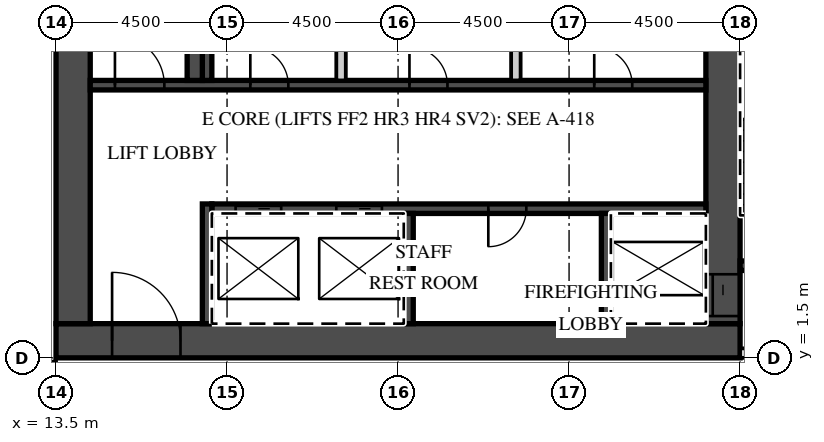
"""IFC4 building model, lengths in metres.
Left out: names, types, materials, properties, quantities, classifications, styles, units other than length and angle.
Written with IfcOpenShell. Run it as: python <this file> out.ifc"""

import sys

from ifc_helpers import new_model, si_unit, direction, frame, frame_2d, origin, place, context, subcontext, project, spatial, rectangle, extrude, element, fill, save


model = new_model("IFC4")
c1 = context("Model", 3, precision=1e-05, world=origin(), true_north=direction((0.0, 1.0)))
c2 = subcontext(c1, "Body", "Model", "MODEL_VIEW")
j1 = project(units=[si_unit("LENGTHUNIT", "METRE"), si_unit("PLANEANGLEUNIT", "RADIAN")], contexts=[c1])
p1 = place(None, origin())
s1 = spatial("IfcSite", under=j1, at=p1, CompositionType="ELEMENT")
p2 = place(p1, origin())
s2 = spatial("IfcBuilding", under=s1, at=p2, CompositionType="ELEMENT")
p3 = place(p2, frame((0.0, 0.0, 268.5)))
s3 = spatial("IfcBuildingStorey", under=s2, at=p3, CompositionType="ELEMENT", Elevation=268.5)
p4 = place(p3, frame((-39.909, 1.3, 0.0), z_axis=(0.0, 0.0, 1.0), x_axis=(1.0, 0.0, 0.0)))
e1 = element("IfcWall", 1, at=p4, inside=s3, PredefinedType="PARTITIONING", context=c2, shape_type="SweptSolid", body=[
    extrude(rectangle(XDim=53.409, YDim=0.2, at=frame_2d((26.705, 0.0))), origin(), (0.0, 0.0, 1.0), 3.02),
])
p5 = place(p4, frame((0.15, 0.0, 0.0)))
e2 = element("IfcOpeningElement", 2, at=p5, cuts=e1, PredefinedType="OPENING", context=c2, shape_type="SweptSolid", body=[
    extrude(rectangle(XDim=0.9, YDim=2.1, at=frame_2d((0.45, 1.05))), frame((0.0, 0.11, 0.0), z_axis=(0.0, -1.0, 0.0), x_axis=(1.0, 0.0, 0.0)), (0.0, 0.0, 1.0), 0.22),
])
p6 = place(p4, frame((9.271, 0.0, 0.0)))
e3 = element("IfcOpeningElement", 3, at=p6, cuts=e1, PredefinedType="OPENING", context=c2, shape_type="SweptSolid", body=[
    extrude(rectangle(XDim=1.2, YDim=2.1, at=frame_2d((0.6, 1.05))), frame((0.0, 0.11, 0.0), z_axis=(0.0, -1.0, 0.0), x_axis=(1.0, 0.0, 0.0)), (0.0, 0.0, 1.0), 0.22),
])
p7 = place(p4, frame((18.271, 0.0, 0.0)))
e4 = element("IfcOpeningElement", 4, at=p7, cuts=e1, PredefinedType="OPENING", context=c2, shape_type="SweptSolid", body=[
    extrude(rectangle(XDim=1.2, YDim=2.1, at=frame_2d((0.6, 1.05))), frame((0.0, 0.11, 0.0), z_axis=(0.0, -1.0, 0.0), x_axis=(1.0, 0.0, 0.0)), (0.0, 0.0, 1.0), 0.22),
])
p8 = place(p4, frame((27.271, 0.0, 0.0)))
e5 = element("IfcOpeningElement", 5, at=p8, cuts=e1, PredefinedType="OPENING", context=c2, shape_type="SweptSolid", body=[
    extrude(rectangle(XDim=1.2, YDim=2.1, at=frame_2d((0.6, 1.05))), frame((0.0, 0.11, 0.0), z_axis=(0.0, -1.0, 0.0), x_axis=(1.0, 0.0, 0.0)), (0.0, 0.0, 1.0), 0.22),
])
p9 = place(p4, frame((36.271, 0.0, 0.0)))
e6 = element("IfcOpeningElement", 6, at=p9, cuts=e1, PredefinedType="OPENING", context=c2, shape_type="SweptSolid", body=[
    extrude(rectangle(XDim=1.2, YDim=2.1, at=frame_2d((0.6, 1.05))), frame((0.0, 0.11, 0.0), z_axis=(0.0, -1.0, 0.0), x_axis=(1.0, 0.0, 0.0)), (0.0, 0.0, 1.0), 0.22),
])
p10 = place(p4, frame((42.346, 0.0, 0.0)))
e7 = element("IfcOpeningElement", 7, at=p10, cuts=e1, PredefinedType="OPENING", context=c2, shape_type="SweptSolid", body=[
    extrude(rectangle(XDim=1.2, YDim=2.1, at=frame_2d((0.6, 1.05))), frame((0.0, 0.11, 0.0), z_axis=(0.0, -1.0, 0.0), x_axis=(1.0, 0.0, 0.0)), (0.0, 0.0, 1.0), 0.22),
])
p11 = place(p4, frame((51.834, 0.0, 0.0)))
e8 = element("IfcOpeningElement", 8, at=p11, cuts=e1, PredefinedType="OPENING", context=c2, shape_type="SweptSolid", body=[
    extrude(rectangle(XDim=1.0, YDim=2.1, at=frame_2d((0.5, 1.05))), frame((0.0, 0.11, 0.0), z_axis=(0.0, -1.0, 0.0), x_axis=(1.0, 0.0, 0.0)), (0.0, 0.0, 1.0), 0.22),
])
p12 = place(p3, frame((13.5, 1.95, 0.0), z_axis=(0.0, 0.0, 1.0), x_axis=(1.0, 0.0, 0.0)))
e9 = element("IfcWall", 9, at=p12, inside=s3, PredefinedType="SHEAR", context=c2, shape_type="SweptSolid", body=[
    extrude(rectangle(XDim=18.0, YDim=0.9, at=frame_2d((9.0, 0.0))), origin(), (0.0, 0.0, 1.0), 3.02),
])
p13 = place(p12, frame((1.475, 0.0, 0.0)))
e10 = element("IfcOpeningElement", 10, at=p13, cuts=e9, PredefinedType="OPENING", context=c2, shape_type="SweptSolid", body=[
    extrude(rectangle(XDim=1.8, YDim=2.1, at=frame_2d((0.9, 1.05))), frame((0.0, 0.46, 0.0), z_axis=(0.0, -1.0, 0.0), x_axis=(1.0, 0.0, 0.0)), (0.0, 0.0, 1.0), 0.92),
])
p14 = place(p3, frame((31.05, 2.4, 0.0), z_axis=(0.0, 0.0, 1.0), x_axis=(0.0, 1.0, 0.0)))
e11 = element("IfcWall", 11, at=p14, inside=s3, PredefinedType="SHEAR", context=c2, shape_type="SweptSolid", body=[
    extrude(rectangle(XDim=12.8, YDim=0.9, at=frame_2d((6.4, 0.0))), origin(), (0.0, 0.0, 1.0), 3.02),
])
p15 = place(p14, frame((0.2, 0.0, 0.0)))
e12 = element("IfcOpeningElement", 12, at=p15, cuts=e11, PredefinedType="OPENING", context=c2, shape_type="SweptSolid", body=[
    extrude(rectangle(XDim=1.1, YDim=2.1, at=frame_2d((0.55, 1.05))), frame((0.0, 0.46, 0.0), z_axis=(0.0, -1.0, 0.0), x_axis=(1.0, 0.0, 0.0)), (0.0, 0.0, 1.0), 0.92),
])
p16 = place(p3, frame((13.95, 2.4, 0.0), z_axis=(0.0, 0.0, 1.0), x_axis=(0.0, 1.0, 0.0)))
e13 = element("IfcWall", 13, at=p16, inside=s3, PredefinedType="SHEAR", context=c2, shape_type="SweptSolid", body=[
    extrude(rectangle(XDim=12.2, YDim=0.9, at=frame_2d((6.1, 0.0))), origin(), (0.0, 0.0, 1.0), 3.02),
])
p17 = place(p3, frame((17.6, 5.425, 0.0), z_axis=(0.0, 0.0, 1.0), x_axis=(1.0, 0.0, 0.0)))
e14 = element("IfcWall", 14, at=p17, inside=s3, PredefinedType="SHEAR", context=c2, shape_type="SweptSolid", body=[
    extrude(rectangle(XDim=13.0, YDim=0.25, at=frame_2d((6.5, 0.0))), origin(), (0.0, 0.0, 1.0), 3.02),
])
p18 = place(p17, frame((3.275, 0.0, 0.0)))
e15 = element("IfcOpeningElement", 15, at=p18, cuts=e14, PredefinedType="OPENING", context=c2, shape_type="SweptSolid", body=[
    extrude(rectangle(XDim=1.2, YDim=2.1, at=frame_2d((0.6, 1.05))), frame((0.0, 0.135, 0.0), z_axis=(0.0, -1.0, 0.0), x_axis=(1.0, 0.0, 0.0)), (0.0, 0.0, 1.0), 0.27),
])
p19 = place(p17, frame((0.625, 0.0, 0.0)))
e16 = element("IfcOpeningElement", 16, at=p19, cuts=e14, PredefinedType="OPENING", context=c2, shape_type="SweptSolid", body=[
    extrude(rectangle(XDim=1.2, YDim=2.1, at=frame_2d((0.6, 1.05))), frame((0.0, 0.135, 0.0), z_axis=(0.0, -1.0, 0.0), x_axis=(1.0, 0.0, 0.0)), (0.0, 0.0, 1.0), 0.27),
])
p20 = place(p17, frame((7.275, 0.0, 0.0)))
e17 = element("IfcOpeningElement", 17, at=p20, cuts=e14, PredefinedType="OPENING", context=c2, shape_type="SweptSolid", body=[
    extrude(rectangle(XDim=1.0, YDim=2.1, at=frame_2d((0.5, 1.05))), frame((0.0, 0.135, 0.0), z_axis=(0.0, -1.0, 0.0), x_axis=(1.0, 0.0, 0.0)), (0.0, 0.0, 1.0), 0.27),
])
p21 = place(p3, frame((17.475, 2.4, 0.0), z_axis=(0.0, 0.0, 1.0), x_axis=(0.0, 1.0, 0.0)))
e18 = element("IfcWall", 18, at=p21, inside=s3, PredefinedType="SHEAR", context=c2, shape_type="SweptSolid", body=[
    extrude(rectangle(XDim=3.15, YDim=0.25, at=frame_2d((1.575, 0.0))), origin(), (0.0, 0.0, 1.0), 3.02),
])
for number, where, z_axis, x_axis in (
    (19, (27.975, 2.4, 0.0), (0.0, 0.0, 1.0), (0.0, 1.0, 0.0)),
    (20, (22.775, 2.4, 0.0), (0.0, 0.0, 1.0), (0.0, 1.0, 0.0)),
):
    element("IfcWall", number, at=place(p3, frame(where, z_axis=z_axis, x_axis=x_axis)), inside=s3, PredefinedType="SHEAR", context=c2, shape_type="SweptSolid", body=[
        extrude(rectangle(XDim=2.9, YDim=0.25, at=frame_2d((1.45, 0.0))), origin(), (0.0, 0.0, 1.0), 3.02),
    ])
p22 = place(p3, frame((14.4, 8.675, 0.0), z_axis=(0.0, 0.0, 1.0), x_axis=(1.0, 0.0, 0.0)))
e21 = element("IfcWall", 21, at=p22, inside=s3, PredefinedType="SHEAR", context=c2, shape_type="SweptSolid", body=[
    extrude(rectangle(XDim=16.2, YDim=0.25, at=frame_2d((8.1, 0.0))), origin(), (0.0, 0.0, 1.0), 3.02),
])
p23 = place(p22, frame((0.65, 0.0, 0.0)))
e22 = element("IfcOpeningElement", 22, at=p23, cuts=e21, PredefinedType="OPENING", context=c2, shape_type="SweptSolid", body=[
    extrude(rectangle(XDim=1.3, YDim=2.1, at=frame_2d((0.65, 1.05))), frame((0.0, 0.135, 0.0), z_axis=(0.0, -1.0, 0.0), x_axis=(1.0, 0.0, 0.0)), (0.0, 0.0, 1.0), 0.27),
])
p24 = place(p22, frame((13.262, 0.0, 0.0)))
e23 = element("IfcOpeningElement", 23, at=p24, cuts=e21, PredefinedType="OPENING", context=c2, shape_type="SweptSolid", body=[
    extrude(rectangle(XDim=1.0, YDim=2.1, at=frame_2d((0.5, 1.05))), frame((0.0, 0.135, 0.0), z_axis=(0.0, -1.0, 0.0), x_axis=(1.0, 0.0, 0.0)), (0.0, 0.0, 1.0), 0.27),
])
p25 = place(p22, frame((8.4, 0.0, 0.0)))
e24 = element("IfcOpeningElement", 24, at=p25, cuts=e21, PredefinedType="OPENING", context=c2, shape_type="SweptSolid", body=[
    extrude(rectangle(XDim=1.0, YDim=2.1, at=frame_2d((0.5, 1.05))), frame((0.0, 0.135, 0.0), z_axis=(0.0, -1.0, 0.0), x_axis=(1.0, 0.0, 0.0)), (0.0, 0.0, 1.0), 0.27),
])
p26 = place(p22, frame((4.212, 0.0, 0.0)))
e25 = element("IfcOpeningElement", 25, at=p26, cuts=e21, PredefinedType="OPENING", context=c2, shape_type="SweptSolid", body=[
    extrude(rectangle(XDim=1.0, YDim=2.1, at=frame_2d((0.5, 1.05))), frame((0.0, 0.135, 0.0), z_axis=(0.0, -1.0, 0.0), x_axis=(1.0, 0.0, 0.0)), (0.0, 0.0, 1.0), 0.27),
])
p27 = place(p3, frame((17.475, 8.8, 0.0), z_axis=(0.0, 0.0, 1.0), x_axis=(0.0, 1.0, 0.0)))
e26 = element("IfcWall", 26, at=p27, inside=s3, PredefinedType="SHEAR", context=c2, shape_type="SweptSolid", body=[
    extrude(rectangle(XDim=2.9, YDim=0.25, at=frame_2d((1.45, 0.0))), origin(), (0.0, 0.0, 1.0), 3.02),
])
for number, where, z_axis, x_axis in (
    (27, (25.6, 8.8, 0.0), (0.0, 0.0, 1.0), (0.0, 1.0, 0.0)),
    (28, (21.0, 8.8, 0.0), (0.0, 0.0, 1.0), (0.0, 1.0, 0.0)),
):
    element("IfcWall", number, at=place(p3, frame(where, z_axis=z_axis, x_axis=x_axis)), inside=s3, PredefinedType="PARTITIONING", context=c2, shape_type="SweptSolid", body=[
        extrude(rectangle(XDim=2.9, YDim=0.25, at=frame_2d((1.45, 0.0))), origin(), (0.0, 0.0, 1.0), 3.02),
    ])
p28 = place(p3, frame((17.15, 8.8, 0.0), z_axis=(0.0, 0.0, 1.0), x_axis=(0.0, 1.0, 0.0)))
e29 = element("IfcWall", 29, at=p28, inside=s3, PredefinedType="SHEAR", context=c2, shape_type="SweptSolid", body=[
    extrude(rectangle(XDim=5.8, YDim=0.4, at=frame_2d((2.9, 0.0))), origin(), (0.0, 0.0, 1.0), 3.02),
])
p29 = place(p3, frame((31.5, 1.625, 0.0), z_axis=(0.0, 0.0, 1.0), x_axis=(1.0, 0.0, 0.0)))
e30 = element("IfcWall", 30, at=p29, inside=s3, PredefinedType="PARTITIONING", context=c2, shape_type="SweptSolid", body=[
    extrude(rectangle(XDim=5.012, YDim=0.25, at=frame_2d((2.506, 0.0))), origin(), (0.0, 0.0, 1.0), 3.02),
])
p30 = place(p29, frame((0.625, 0.0, 0.0)))
e31 = element("IfcOpeningElement", 31, at=p30, cuts=e30, PredefinedType="OPENING", context=c2, shape_type="SweptSolid", body=[
    extrude(rectangle(XDim=1.3, YDim=2.1, at=frame_2d((0.65, 1.05))), frame((0.0, 0.135, 0.0), z_axis=(0.0, -1.0, 0.0), x_axis=(1.0, 0.0, 0.0)), (0.0, 0.0, 1.0), 0.27),
])
p31 = place(p29, frame((3.25, 0.0, 0.0)))
e32 = element("IfcOpeningElement", 32, at=p31, cuts=e30, PredefinedType="OPENING", context=c2, shape_type="SweptSolid", body=[
    extrude(rectangle(XDim=1.1, YDim=2.1, at=frame_2d((0.55, 1.05))), frame((0.0, 0.135, 0.0), z_axis=(0.0, -1.0, 0.0), x_axis=(1.0, 0.0, 0.0)), (0.0, 0.0, 1.0), 0.27),
])
p32 = place(p3, frame((31.5, 3.925, 0.0), z_axis=(0.0, 0.0, 1.0), x_axis=(1.0, 0.0, 0.0)))
e33 = element("IfcWall", 33, at=p32, inside=s3, PredefinedType="SHEAR", context=c2, shape_type="SweptSolid", body=[
    extrude(rectangle(XDim=2.55, YDim=0.25, at=frame_2d((1.275, 0.0))), origin(), (0.0, 0.0, 1.0), 3.02),
])
p33 = place(p32, frame((0.625, 0.0, 0.0)))
e34 = element("IfcOpeningElement", 34, at=p33, cuts=e33, PredefinedType="OPENING", context=c2, shape_type="SweptSolid", body=[
    extrude(rectangle(XDim=1.3, YDim=2.1, at=frame_2d((0.65, 1.05))), frame((0.0, 0.135, 0.0), z_axis=(0.0, -1.0, 0.0), x_axis=(1.0, 0.0, 0.0)), (0.0, 0.0, 1.0), 0.27),
])
p34 = place(p18, origin())
e35 = element("IfcDoor", 35, at=p34, inside=s3, OperationType="SLIDING_TO_RIGHT", PredefinedType="DOOR", context=c2, shape_type="SweptSolid", body=[
    extrude(rectangle(XDim=1.2, YDim=2.1, at=frame_2d((0.6, 1.05))), frame((0.0, 0.025, 0.0), z_axis=(0.0, -1.0, 0.0), x_axis=(1.0, 0.0, 0.0)), (0.0, 0.0, 1.0), 0.05),
])
fill(e15, e35)
p35 = place(p19, origin())
e36 = element("IfcDoor", 36, at=p35, inside=s3, OperationType="SLIDING_TO_LEFT", PredefinedType="DOOR", context=c2, shape_type="SweptSolid", body=[
    extrude(rectangle(XDim=1.2, YDim=2.1, at=frame_2d((0.6, 1.05))), frame((0.0, 0.025, 0.0), z_axis=(0.0, -1.0, 0.0), x_axis=(1.0, 0.0, 0.0)), (0.0, 0.0, 1.0), 0.05),
])
fill(e16, e36)
p36 = place(p15, origin())
e37 = element("IfcDoor", 37, at=p36, inside=s3, OperationType="SLIDING_TO_LEFT", PredefinedType="DOOR", context=c2, shape_type="SweptSolid", body=[
    extrude(rectangle(XDim=1.1, YDim=2.1, at=frame_2d((0.55, 1.05))), frame((0.0, 0.025, 0.0), z_axis=(0.0, -1.0, 0.0), x_axis=(1.0, 0.0, 0.0)), (0.0, 0.0, 1.0), 0.05),
])
fill(e12, e37)
p37 = place(p13, origin())
e38 = element("IfcDoor", 38, at=p37, inside=s3, OperationType="DOUBLE_DOOR_DOUBLE_SWING", PredefinedType="DOOR", context=c2, shape_type="SweptSolid", body=[
    extrude(rectangle(XDim=1.8, YDim=2.1, at=frame_2d((0.9, 1.05))), frame((0.0, 0.025, 0.0), z_axis=(0.0, -1.0, 0.0), x_axis=(1.0, 0.0, 0.0)), (0.0, 0.0, 1.0), 0.05),
])
fill(e10, e38)
p38 = place(p23, origin())
e39 = element("IfcDoor", 39, at=p38, inside=s3, OperationType="SINGLE_SWING_LEFT", PredefinedType="DOOR", context=c2, shape_type="SweptSolid", body=[
    extrude(rectangle(XDim=1.3, YDim=2.1, at=frame_2d((0.65, 1.05))), frame((0.0, 0.025, 0.0), z_axis=(0.0, -1.0, 0.0), x_axis=(1.0, 0.0, 0.0)), (0.0, 0.0, 1.0), 0.05),
])
fill(e22, e39)
p39 = place(p24, origin())
e40 = element("IfcDoor", 40, at=p39, inside=s3, OperationType="SINGLE_SWING_LEFT", PredefinedType="DOOR", context=c2, shape_type="SweptSolid", body=[
    extrude(rectangle(XDim=1.0, YDim=2.1, at=frame_2d((0.5, 1.05))), frame((0.0, 0.025, 0.0), z_axis=(0.0, -1.0, 0.0), x_axis=(1.0, 0.0, 0.0)), (0.0, 0.0, 1.0), 0.05),
])
fill(e23, e40)
p40 = place(p25, origin())
e41 = element("IfcDoor", 41, at=p40, inside=s3, OperationType="SINGLE_SWING_LEFT", PredefinedType="DOOR", context=c2, shape_type="SweptSolid", body=[
    extrude(rectangle(XDim=1.0, YDim=2.1, at=frame_2d((0.5, 1.05))), frame((0.0, 0.025, 0.0), z_axis=(0.0, -1.0, 0.0), x_axis=(1.0, 0.0, 0.0)), (0.0, 0.0, 1.0), 0.05),
])
fill(e24, e41)
p41 = place(p26, origin())
e42 = element("IfcDoor", 42, at=p41, inside=s3, OperationType="SINGLE_SWING_LEFT", PredefinedType="DOOR", context=c2, shape_type="SweptSolid", body=[
    extrude(rectangle(XDim=1.0, YDim=2.1, at=frame_2d((0.5, 1.05))), frame((0.0, 0.025, 0.0), z_axis=(0.0, -1.0, 0.0), x_axis=(1.0, 0.0, 0.0)), (0.0, 0.0, 1.0), 0.05),
])
fill(e25, e42)
p42 = place(p20, origin())
e43 = element("IfcDoor", 43, at=p42, inside=s3, OperationType="SINGLE_SWING_LEFT", PredefinedType="DOOR", context=c2, shape_type="SweptSolid", body=[
    extrude(rectangle(XDim=1.0, YDim=2.1, at=frame_2d((0.5, 1.05))), frame((0.0, 0.025, 0.0), z_axis=(0.0, -1.0, 0.0), x_axis=(1.0, 0.0, 0.0)), (0.0, 0.0, 1.0), 0.05),
])
fill(e17, e43)
save(model, sys.argv[1])
